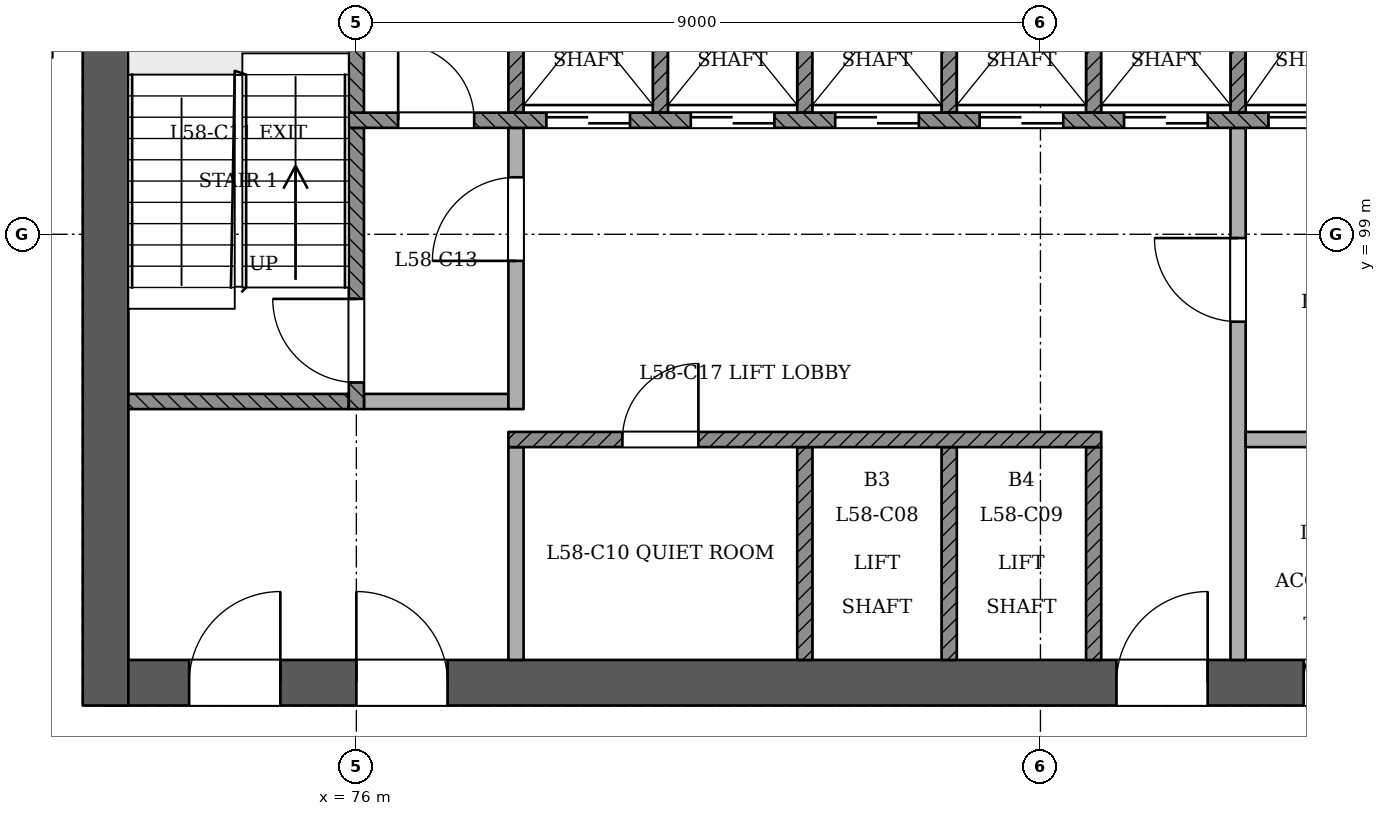
"""IFC4 building model, lengths in metres.
Left out: names, types, materials, properties, quantities, classifications, styles, units other than length and angle.
Written with IfcOpenShell. Run it as: python <this file> out.ifc"""

import sys

from ifc_helpers import new_model, si_unit, direction, frame, frame_2d, origin, place, context, subcontext, project, spatial, rectangle, extrude, element, fill, save


model = new_model("IFC4")
c1 = context("Model", 3, precision=1e-05, world=origin(), true_north=direction((0.0, 1.0)))
c2 = subcontext(c1, "Body", "Model", "MODEL_VIEW")
j1 = project(units=[si_unit("LENGTHUNIT", "METRE"), si_unit("PLANEANGLEUNIT", "RADIAN")], contexts=[c1])
p1 = place(None, origin())
s1 = spatial("IfcSite", under=j1, at=p1, CompositionType="ELEMENT")
p2 = place(p1, origin())
s2 = spatial("IfcBuilding", under=s1, at=p2, CompositionType="ELEMENT")
p3 = place(p2, frame((0.0, 0.0, 226.6)))
s3 = spatial("IfcBuildingStorey", under=s2, at=p3, CompositionType="ELEMENT", Elevation=226.6)
p4 = place(p3, frame((72.7, 93.1, 0.0), z_axis=(0.0, 0.0, 1.0), x_axis=(1.0, 0.0, 0.0)))
e1 = element("IfcWall", 1, at=p4, inside=s3, PredefinedType="SHEAR", context=c2, shape_type="SweptSolid", body=[
    extrude(rectangle(XDim=24.9, YDim=0.6, at=frame_2d((12.45, 0.0))), origin(), (0.0, 0.0, 1.0), 3.6),
])
p5 = place(p4, frame((1.1, 0.0, 0.0)))
e2 = element("IfcOpeningElement", 2, at=p5, cuts=e1, PredefinedType="OPENING", context=c2, shape_type="SweptSolid", body=[
    extrude(rectangle(XDim=1.2, YDim=2.1, at=frame_2d((0.6, 1.05))), frame((0.0, 0.311, 0.0), z_axis=(0.0, -1.0, 0.0), x_axis=(1.0, 0.0, 0.0)), (0.0, 0.0, 1.0), 0.621),
])
p6 = place(p4, frame((3.3, 0.0, 0.0)))
e3 = element("IfcOpeningElement", 3, at=p6, cuts=e1, PredefinedType="OPENING", context=c2, shape_type="SweptSolid", body=[
    extrude(rectangle(XDim=1.2, YDim=2.1, at=frame_2d((0.6, 1.05))), frame((0.0, 0.311, 0.0), z_axis=(0.0, -1.0, 0.0), x_axis=(1.0, 0.0, 0.0)), (0.0, 0.0, 1.0), 0.621),
])
p7 = place(p4, frame((13.3, 0.0, 0.0)))
e4 = element("IfcOpeningElement", 4, at=p7, cuts=e1, PredefinedType="OPENING", context=c2, shape_type="SweptSolid", body=[
    extrude(rectangle(XDim=1.2, YDim=2.1, at=frame_2d((0.6, 1.05))), frame((0.0, 0.311, 0.0), z_axis=(0.0, -1.0, 0.0), x_axis=(1.0, 0.0, 0.0)), (0.0, 0.0, 1.0), 0.621),
])
p8 = place(p4, frame((15.762, 0.0, 0.0)))
e5 = element("IfcOpeningElement", 5, at=p8, cuts=e1, PredefinedType="OPENING", context=c2, shape_type="SweptSolid", body=[
    extrude(rectangle(XDim=1.0, YDim=2.1, at=frame_2d((0.5, 1.05))), frame((0.0, 0.311, 0.0), z_axis=(0.0, -1.0, 0.0), x_axis=(1.0, 0.0, 0.0)), (0.0, 0.0, 1.0), 0.621),
])
p9 = place(p4, frame((18.2, 0.0, 0.0)))
e6 = element("IfcOpeningElement", 6, at=p9, cuts=e1, PredefinedType="OPENING", context=c2, shape_type="SweptSolid", body=[
    extrude(rectangle(XDim=1.0, YDim=2.1, at=frame_2d((0.5, 1.05))), frame((0.0, 0.311, 0.0), z_axis=(0.0, -1.0, 0.0), x_axis=(1.0, 0.0, 0.0)), (0.0, 0.0, 1.0), 0.621),
])
p10 = place(p4, frame((20.55, 0.0, 0.0)))
e7 = element("IfcOpeningElement", 7, at=p10, cuts=e1, PredefinedType="OPENING", context=c2, shape_type="SweptSolid", body=[
    extrude(rectangle(XDim=1.0, YDim=2.1, at=frame_2d((0.5, 1.05))), frame((0.0, 0.311, 0.0), z_axis=(0.0, -1.0, 0.0), x_axis=(1.0, 0.0, 0.0)), (0.0, 0.0, 1.0), 0.621),
])
p11 = place(p4, frame((22.837, 0.0, 0.0)))
e8 = element("IfcOpeningElement", 8, at=p11, cuts=e1, PredefinedType="OPENING", context=c2, shape_type="SweptSolid", body=[
    extrude(rectangle(XDim=1.0, YDim=2.1, at=frame_2d((0.5, 1.05))), frame((0.0, 0.311, 0.0), z_axis=(0.0, -1.0, 0.0), x_axis=(1.0, 0.0, 0.0)), (0.0, 0.0, 1.0), 0.621),
])
p12 = place(p3, frame((72.7, 103.7, 0.0), z_axis=(0.0, 0.0, 1.0), x_axis=(0.0, -1.0, 0.0)))
e9 = element("IfcWall", 9, at=p12, inside=s3, PredefinedType="SHEAR", context=c2, shape_type="SweptSolid", body=[
    extrude(rectangle(XDim=10.9, YDim=0.6, at=frame_2d((5.45, 0.0))), origin(), (0.0, 0.0, 1.0), 3.6),
])
p13 = place(p3, frame((72.0, 101.4, 0.0), z_axis=(0.0, 0.0, 1.0), x_axis=(-1.0, 0.0, 0.0)))
e10 = element("IfcWall", 10, at=p13, inside=s3, PredefinedType="PARTITIONING", context=c2, shape_type="SweptSolid", body=[
    extrude(rectangle(XDim=1.8, YDim=0.15, at=frame_2d((0.9, 0.0))), origin(), (0.0, 0.0, 1.0), 3.2),
])
p14 = place(p3, frame((78.1, 93.4, 0.0), z_axis=(0.0, 0.0, 1.0), x_axis=(0.0, 1.0, 0.0)))
e11 = element("IfcWall", 11, at=p14, inside=s3, PredefinedType="PARTITIONING", context=c2, shape_type="SweptSolid", body=[
    extrude(rectangle(XDim=2.8, YDim=0.2, at=frame_2d((1.4, 0.0))), origin(), (0.0, 0.0, 1.0), 3.2),
])
for number, where, z_axis, x_axis in (
    (12, (81.9, 93.4, 0.0), (0.0, 0.0, 1.0), (0.0, 1.0, 0.0)),
    (13, (83.8, 93.4, 0.0), (0.0, 0.0, 1.0), (0.0, 1.0, 0.0)),
    (14, (85.7, 93.4, 0.0), (0.0, 0.0, 1.0), (0.0, 1.0, 0.0)),
):
    element("IfcWall", number, at=place(p3, frame(where, z_axis=z_axis, x_axis=x_axis)), inside=s3, PredefinedType="SOLIDWALL", context=c2, shape_type="SweptSolid", body=[
        extrude(rectangle(XDim=2.8, YDim=0.2, at=frame_2d((1.4, 0.0))), origin(), (0.0, 0.0, 1.0), 3.2),
    ])
p15 = place(p3, frame((87.6, 93.4, 0.0), z_axis=(0.0, 0.0, 1.0), x_axis=(0.0, 1.0, 0.0)))
e15 = element("IfcWall", 15, at=p15, inside=s3, PredefinedType="PARTITIONING", context=c2, shape_type="SweptSolid", body=[
    extrude(rectangle(XDim=7.0, YDim=0.2, at=frame_2d((3.5, 0.0))), origin(), (0.0, 0.0, 1.0), 3.2),
])
p16 = place(p15, frame((4.45, 0.0, 0.0)))
e16 = element("IfcOpeningElement", 16, at=p16, cuts=e15, PredefinedType="OPENING", context=c2, shape_type="SweptSolid", body=[
    extrude(rectangle(XDim=1.1, YDim=2.1, at=frame_2d((0.55, 1.05))), frame((0.0, 0.11, 0.0), z_axis=(0.0, -1.0, 0.0), x_axis=(1.0, 0.0, 0.0)), (0.0, 0.0, 1.0), 0.221),
])
p17 = place(p3, frame((78.0, 96.3, 0.0), z_axis=(0.0, 0.0, 1.0), x_axis=(1.0, 0.0, 0.0)))
e17 = element("IfcWall", 17, at=p17, inside=s3, PredefinedType="SOLIDWALL", context=c2, shape_type="SweptSolid", body=[
    extrude(rectangle(XDim=7.8, YDim=0.2, at=frame_2d((3.9, 0.0))), origin(), (0.0, 0.0, 1.0), 3.2),
])
p18 = place(p17, frame((1.5, 0.0, 0.0)))
e18 = element("IfcOpeningElement", 18, at=p18, cuts=e17, PredefinedType="OPENING", context=c2, shape_type="SweptSolid", body=[
    extrude(rectangle(XDim=1.0, YDim=2.1, at=frame_2d((0.5, 1.05))), frame((0.0, 0.11, 0.0), z_axis=(0.0, -1.0, 0.0), x_axis=(1.0, 0.0, 0.0)), (0.0, 0.0, 1.0), 0.221),
])
p19 = place(p3, frame((87.7, 96.3, 0.0), z_axis=(0.0, 0.0, 1.0), x_axis=(1.0, 0.0, 0.0)))
e19 = element("IfcWall", 19, at=p19, inside=s3, PredefinedType="PARTITIONING", context=c2, shape_type="SweptSolid", body=[
    extrude(rectangle(XDim=3.6, YDim=0.2, at=frame_2d((1.8, 0.0))), origin(), (0.0, 0.0, 1.0), 3.2),
])
p20 = place(p3, frame((73.0, 96.8, 0.0), z_axis=(0.0, 0.0, 1.0), x_axis=(1.0, 0.0, 0.0)))
e20 = element("IfcWall", 20, at=p20, inside=s3, PredefinedType="SOLIDWALL", context=c2, shape_type="SweptSolid", body=[
    extrude(rectangle(XDim=2.9, YDim=0.2, at=frame_2d((1.45, 0.0))), origin(), (0.0, 0.0, 1.0), 3.2),
])
p21 = place(p3, frame((76.0, 96.7, 0.0), z_axis=(0.0, 0.0, 1.0), x_axis=(0.0, 1.0, 0.0)))
e21 = element("IfcWall", 21, at=p21, inside=s3, PredefinedType="SOLIDWALL", context=c2, shape_type="SweptSolid", body=[
    extrude(rectangle(XDim=3.7, YDim=0.2, at=frame_2d((1.85, 0.0))), origin(), (0.0, 0.0, 1.0), 3.2),
])
p22 = place(p21, frame((0.35, 0.0, 0.0)))
e22 = element("IfcOpeningElement", 22, at=p22, cuts=e21, PredefinedType="OPENING", context=c2, shape_type="SweptSolid", body=[
    extrude(rectangle(XDim=1.1, YDim=2.1, at=frame_2d((0.55, 1.05))), frame((0.0, 0.11, 0.0), z_axis=(0.0, -1.0, 0.0), x_axis=(1.0, 0.0, 0.0)), (0.0, 0.0, 1.0), 0.221),
])
p23 = place(p3, frame((76.1, 96.8, 0.0), z_axis=(0.0, 0.0, 1.0), x_axis=(1.0, 0.0, 0.0)))
e23 = element("IfcWall", 23, at=p23, inside=s3, PredefinedType="PARTITIONING", context=c2, shape_type="SweptSolid", body=[
    extrude(rectangle(XDim=1.9, YDim=0.2, at=frame_2d((0.95, 0.0))), origin(), (0.0, 0.0, 1.0), 3.2),
])
p24 = place(p3, frame((78.1, 96.7, 0.0), z_axis=(0.0, 0.0, 1.0), x_axis=(0.0, 1.0, 0.0)))
e24 = element("IfcWall", 24, at=p24, inside=s3, PredefinedType="PARTITIONING", context=c2, shape_type="SweptSolid", body=[
    extrude(rectangle(XDim=3.7, YDim=0.2, at=frame_2d((1.85, 0.0))), origin(), (0.0, 0.0, 1.0), 3.2),
])
p25 = place(p24, frame((1.95, 0.0, 0.0)))
e25 = element("IfcOpeningElement", 25, at=p25, cuts=e24, PredefinedType="OPENING", context=c2, shape_type="SweptSolid", body=[
    extrude(rectangle(XDim=1.1, YDim=2.1, at=frame_2d((0.55, 1.05))), frame((0.0, 0.11, 0.0), z_axis=(0.0, -1.0, 0.0), x_axis=(1.0, 0.0, 0.0)), (0.0, 0.0, 1.0), 0.221),
])
p26 = place(p3, frame((75.9, 100.5, 0.0), z_axis=(0.0, 0.0, 1.0), x_axis=(1.0, 0.0, 0.0)))
e26 = element("IfcWall", 26, at=p26, inside=s3, PredefinedType="SOLIDWALL", context=c2, shape_type="SweptSolid", body=[
    extrude(rectangle(XDim=18.2, YDim=0.2, at=frame_2d((9.1, 0.0))), origin(), (0.0, 0.0, 1.0), 3.2),
])
p27 = place(p26, frame((2.6, 0.0, 0.0)))
e27 = element("IfcOpeningElement", 27, at=p27, cuts=e26, PredefinedType="OPENING", context=c2, shape_type="SweptSolid", body=[
    extrude(rectangle(XDim=1.1, YDim=2.1, at=frame_2d((0.55, 1.05))), frame((0.0, 0.11, 0.0), z_axis=(0.0, -1.0, 0.0), x_axis=(1.0, 0.0, 0.0)), (0.0, 0.0, 1.0), 0.221),
])
p28 = place(p26, frame((4.5, 0.0, 0.0)))
e28 = element("IfcOpeningElement", 28, at=p28, cuts=e26, PredefinedType="OPENING", context=c2, shape_type="SweptSolid", body=[
    extrude(rectangle(XDim=1.1, YDim=2.1, at=frame_2d((0.55, 1.05))), frame((0.0, 0.11, 0.0), z_axis=(0.0, -1.0, 0.0), x_axis=(1.0, 0.0, 0.0)), (0.0, 0.0, 1.0), 0.221),
])
p29 = place(p26, frame((6.4, 0.0, 0.0)))
e29 = element("IfcOpeningElement", 29, at=p29, cuts=e26, PredefinedType="OPENING", context=c2, shape_type="SweptSolid", body=[
    extrude(rectangle(XDim=1.1, YDim=2.1, at=frame_2d((0.55, 1.05))), frame((0.0, 0.11, 0.0), z_axis=(0.0, -1.0, 0.0), x_axis=(1.0, 0.0, 0.0)), (0.0, 0.0, 1.0), 0.221),
])
p30 = place(p26, frame((8.3, 0.0, 0.0)))
e30 = element("IfcOpeningElement", 30, at=p30, cuts=e26, PredefinedType="OPENING", context=c2, shape_type="SweptSolid", body=[
    extrude(rectangle(XDim=1.1, YDim=2.1, at=frame_2d((0.55, 1.05))), frame((0.0, 0.11, 0.0), z_axis=(0.0, -1.0, 0.0), x_axis=(1.0, 0.0, 0.0)), (0.0, 0.0, 1.0), 0.221),
])
p31 = place(p26, frame((10.2, 0.0, 0.0)))
e31 = element("IfcOpeningElement", 31, at=p31, cuts=e26, PredefinedType="OPENING", context=c2, shape_type="SweptSolid", body=[
    extrude(rectangle(XDim=1.1, YDim=2.1, at=frame_2d((0.55, 1.05))), frame((0.0, 0.11, 0.0), z_axis=(0.0, -1.0, 0.0), x_axis=(1.0, 0.0, 0.0)), (0.0, 0.0, 1.0), 0.221),
])
p32 = place(p26, frame((12.1, 0.0, 0.0)))
e32 = element("IfcOpeningElement", 32, at=p32, cuts=e26, PredefinedType="OPENING", context=c2, shape_type="SweptSolid", body=[
    extrude(rectangle(XDim=1.1, YDim=2.1, at=frame_2d((0.55, 1.05))), frame((0.0, 0.11, 0.0), z_axis=(0.0, -1.0, 0.0), x_axis=(1.0, 0.0, 0.0)), (0.0, 0.0, 1.0), 0.221),
])
p33 = place(p26, frame((14.0, 0.0, 0.0)))
e33 = element("IfcOpeningElement", 33, at=p33, cuts=e26, PredefinedType="OPENING", context=c2, shape_type="SweptSolid", body=[
    extrude(rectangle(XDim=1.1, YDim=2.1, at=frame_2d((0.55, 1.05))), frame((0.0, 0.11, 0.0), z_axis=(0.0, -1.0, 0.0), x_axis=(1.0, 0.0, 0.0)), (0.0, 0.0, 1.0), 0.221),
])
p34 = place(p26, frame((0.65, 0.0, 0.0)))
e34 = element("IfcOpeningElement", 34, at=p34, cuts=e26, PredefinedType="OPENING", context=c2, shape_type="SweptSolid", body=[
    extrude(rectangle(XDim=1.0, YDim=2.1, at=frame_2d((0.5, 1.05))), frame((0.0, 0.11, 0.0), z_axis=(0.0, -1.0, 0.0), x_axis=(1.0, 0.0, 0.0)), (0.0, 0.0, 1.0), 0.221),
])
p35 = place(p26, frame((16.3, 0.0, 0.0)))
e35 = element("IfcOpeningElement", 35, at=p35, cuts=e26, PredefinedType="OPENING", context=c2, shape_type="SweptSolid", body=[
    extrude(rectangle(XDim=1.0, YDim=2.1, at=frame_2d((0.5, 1.05))), frame((0.0, 0.11, 0.0), z_axis=(0.0, -1.0, 0.0), x_axis=(1.0, 0.0, 0.0)), (0.0, 0.0, 1.0), 0.221),
])
for number, where, z_axis, x_axis in (
    (36, (76.0, 100.6, 0.0), (0.0, 0.0, 1.0), (0.0, 1.0, 0.0)),
    (37, (78.1, 100.6, 0.0), (0.0, 0.0, 1.0), (0.0, 1.0, 0.0)),
    (38, (80.0, 100.6, 0.0), (0.0, 0.0, 1.0), (0.0, 1.0, 0.0)),
    (39, (81.9, 100.6, 0.0), (0.0, 0.0, 1.0), (0.0, 1.0, 0.0)),
    (40, (83.8, 100.6, 0.0), (0.0, 0.0, 1.0), (0.0, 1.0, 0.0)),
    (41, (85.7, 100.6, 0.0), (0.0, 0.0, 1.0), (0.0, 1.0, 0.0)),
    (42, (87.6, 100.6, 0.0), (0.0, 0.0, 1.0), (0.0, 1.0, 0.0)),
):
    element("IfcWall", number, at=place(p3, frame(where, z_axis=z_axis, x_axis=x_axis)), inside=s3, PredefinedType="SOLIDWALL", context=c2, shape_type="SweptSolid", body=[
        extrude(rectangle(XDim=2.8, YDim=0.2, at=frame_2d((1.4, 0.0))), origin(), (0.0, 0.0, 1.0), 3.2),
    ])
p36 = place(p27, origin())
e43 = element("IfcDoor", 43, at=p36, inside=s3, OperationType="SLIDING_TO_RIGHT", PredefinedType="NOTDEFINED", context=c2, shape_type="SweptSolid", body=[
    extrude(rectangle(XDim=1.1, YDim=2.1, at=frame_2d((0.55, 1.05))), frame((0.0, 0.025, 0.0), z_axis=(0.0, -1.0, 0.0), x_axis=(1.0, 0.0, 0.0)), (0.0, 0.0, 1.0), 0.05),
])
fill(e27, e43)
p37 = place(p28, origin())
e44 = element("IfcDoor", 44, at=p37, inside=s3, OperationType="SLIDING_TO_LEFT", PredefinedType="NOTDEFINED", context=c2, shape_type="SweptSolid", body=[
    extrude(rectangle(XDim=1.1, YDim=2.1, at=frame_2d((0.55, 1.05))), frame((0.0, 0.025, 0.0), z_axis=(0.0, -1.0, 0.0), x_axis=(1.0, 0.0, 0.0)), (0.0, 0.0, 1.0), 0.05),
])
fill(e28, e44)
p38 = place(p29, origin())
e45 = element("IfcDoor", 45, at=p38, inside=s3, OperationType="SLIDING_TO_RIGHT", PredefinedType="NOTDEFINED", context=c2, shape_type="SweptSolid", body=[
    extrude(rectangle(XDim=1.1, YDim=2.1, at=frame_2d((0.55, 1.05))), frame((0.0, 0.025, 0.0), z_axis=(0.0, -1.0, 0.0), x_axis=(1.0, 0.0, 0.0)), (0.0, 0.0, 1.0), 0.05),
])
fill(e29, e45)
p39 = place(p30, origin())
e46 = element("IfcDoor", 46, at=p39, inside=s3, OperationType="SLIDING_TO_LEFT", PredefinedType="NOTDEFINED", context=c2, shape_type="SweptSolid", body=[
    extrude(rectangle(XDim=1.1, YDim=2.1, at=frame_2d((0.55, 1.05))), frame((0.0, 0.025, 0.0), z_axis=(0.0, -1.0, 0.0), x_axis=(1.0, 0.0, 0.0)), (0.0, 0.0, 1.0), 0.05),
])
fill(e30, e46)
p40 = place(p31, origin())
e47 = element("IfcDoor", 47, at=p40, inside=s3, OperationType="SLIDING_TO_RIGHT", PredefinedType="NOTDEFINED", context=c2, shape_type="SweptSolid", body=[
    extrude(rectangle(XDim=1.1, YDim=2.1, at=frame_2d((0.55, 1.05))), frame((0.0, 0.025, 0.0), z_axis=(0.0, -1.0, 0.0), x_axis=(1.0, 0.0, 0.0)), (0.0, 0.0, 1.0), 0.05),
])
fill(e31, e47)
p41 = place(p32, origin())
e48 = element("IfcDoor", 48, at=p41, inside=s3, OperationType="SLIDING_TO_RIGHT", PredefinedType="NOTDEFINED", context=c2, shape_type="SweptSolid", body=[
    extrude(rectangle(XDim=1.1, YDim=2.1, at=frame_2d((0.55, 1.05))), frame((0.0, 0.025, 0.0), z_axis=(0.0, -1.0, 0.0), x_axis=(1.0, 0.0, 0.0)), (0.0, 0.0, 1.0), 0.05),
])
fill(e32, e48)
p42 = place(p22, origin())
e49 = element("IfcDoor", 49, at=p42, inside=s3, OperationType="SINGLE_SWING_RIGHT", PredefinedType="NOTDEFINED", context=c2, shape_type="SweptSolid", body=[
    extrude(rectangle(XDim=1.1, YDim=2.1, at=frame_2d((0.55, 1.05))), frame((0.0, 0.025, 0.0), z_axis=(0.0, -1.0, 0.0), x_axis=(1.0, 0.0, 0.0)), (0.0, 0.0, 1.0), 0.05),
])
fill(e22, e49)
p43 = place(p25, origin())
e50 = element("IfcDoor", 50, at=p43, inside=s3, OperationType="SINGLE_SWING_LEFT", PredefinedType="NOTDEFINED", context=c2, shape_type="SweptSolid", body=[
    extrude(rectangle(XDim=1.1, YDim=2.1, at=frame_2d((0.55, 1.05))), frame((0.0, 0.025, 0.0), z_axis=(0.0, -1.0, 0.0), x_axis=(1.0, 0.0, 0.0)), (0.0, 0.0, 1.0), 0.05),
])
fill(e25, e50)
p44 = place(p16, origin())
e51 = element("IfcDoor", 51, at=p44, inside=s3, OperationType="SINGLE_SWING_RIGHT", PredefinedType="NOTDEFINED", context=c2, shape_type="SweptSolid", body=[
    extrude(rectangle(XDim=1.1, YDim=2.1, at=frame_2d((0.55, 1.05))), frame((0.0, 0.025, 0.0), z_axis=(0.0, -1.0, 0.0), x_axis=(1.0, 0.0, 0.0)), (0.0, 0.0, 1.0), 0.05),
])
fill(e16, e51)
p45 = place(p5, origin())
e52 = element("IfcDoor", 52, at=p45, inside=s3, OperationType="SINGLE_SWING_RIGHT", PredefinedType="NOTDEFINED", context=c2, shape_type="SweptSolid", body=[
    extrude(rectangle(XDim=1.2, YDim=2.1, at=frame_2d((0.6, 1.05))), frame((0.0, 0.025, 0.0), z_axis=(0.0, -1.0, 0.0), x_axis=(1.0, 0.0, 0.0)), (0.0, 0.0, 1.0), 0.05),
])
fill(e2, e52)
p46 = place(p6, origin())
e53 = element("IfcDoor", 53, at=p46, inside=s3, OperationType="SINGLE_SWING_LEFT", PredefinedType="NOTDEFINED", context=c2, shape_type="SweptSolid", body=[
    extrude(rectangle(XDim=1.2, YDim=2.1, at=frame_2d((0.6, 1.05))), frame((0.0, 0.025, 0.0), z_axis=(0.0, -1.0, 0.0), x_axis=(1.0, 0.0, 0.0)), (0.0, 0.0, 1.0), 0.05),
])
fill(e3, e53)
p47 = place(p7, origin())
e54 = element("IfcDoor", 54, at=p47, inside=s3, OperationType="SINGLE_SWING_RIGHT", PredefinedType="NOTDEFINED", context=c2, shape_type="SweptSolid", body=[
    extrude(rectangle(XDim=1.2, YDim=2.1, at=frame_2d((0.6, 1.05))), frame((0.0, 0.025, 0.0), z_axis=(0.0, -1.0, 0.0), x_axis=(1.0, 0.0, 0.0)), (0.0, 0.0, 1.0), 0.05),
])
fill(e4, e54)
p48 = place(p34, origin())
e55 = element("IfcDoor", 55, at=p48, inside=s3, OperationType="SINGLE_SWING_LEFT", PredefinedType="NOTDEFINED", context=c2, shape_type="SweptSolid", body=[
    extrude(rectangle(XDim=1.0, YDim=2.1, at=frame_2d((0.5, 1.05))), frame((0.0, 0.025, 0.0), z_axis=(0.0, -1.0, 0.0), x_axis=(1.0, 0.0, 0.0)), (0.0, 0.0, 1.0), 0.05),
])
fill(e34, e55)
p49 = place(p8, origin())
e56 = element("IfcDoor", 56, at=p49, inside=s3, OperationType="SINGLE_SWING_RIGHT", PredefinedType="NOTDEFINED", context=c2, shape_type="SweptSolid", body=[
    extrude(rectangle(XDim=1.0, YDim=2.1, at=frame_2d((0.5, 1.05))), frame((0.0, 0.025, 0.0), z_axis=(0.0, -1.0, 0.0), x_axis=(1.0, 0.0, 0.0)), (0.0, 0.0, 1.0), 0.05),
])
fill(e5, e56)
p50 = place(p18, origin())
e57 = element("IfcDoor", 57, at=p50, inside=s3, OperationType="SINGLE_SWING_RIGHT", PredefinedType="NOTDEFINED", context=c2, shape_type="SweptSolid", body=[
    extrude(rectangle(XDim=1.0, YDim=2.1, at=frame_2d((0.5, 1.05))), frame((0.0, 0.025, 0.0), z_axis=(0.0, -1.0, 0.0), x_axis=(1.0, 0.0, 0.0)), (0.0, 0.0, 1.0), 0.05),
])
fill(e18, e57)
save(model, sys.argv[1])
